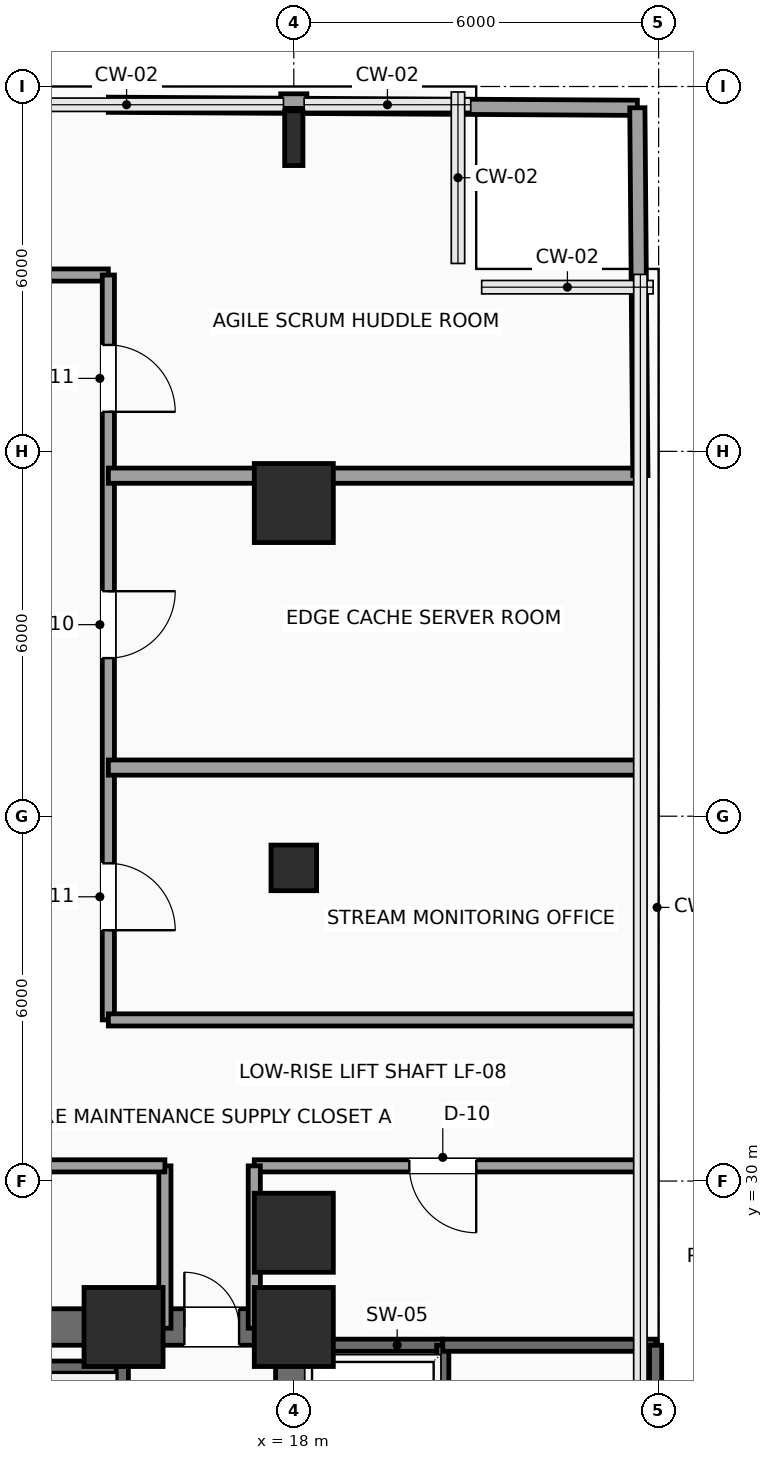
"""IFC4 building model, lengths in metres.
Left out: names, types, materials, properties, quantities, classifications, styles, units other than length and angle.
Written with IfcOpenShell. Run it as: python <this file> out.ifc"""

import sys

from ifc_helpers import new_model, si_unit, direction, frame, frame_2d, origin, origin_2d, place, context, subcontext, project, spatial, rectangle, hollow_rectangle, i_section, extrude, element, fill, save


model = new_model("IFC4")
c1 = context("Model", 3, precision=1e-05, world=origin(), true_north=direction((0.0, 1.0)))
c2 = subcontext(c1, "Body", "Model", "MODEL_VIEW")
j1 = project(units=[si_unit("LENGTHUNIT", "METRE"), si_unit("PLANEANGLEUNIT", "RADIAN")], contexts=[c1])
p1 = place(None, origin())
s1 = spatial("IfcSite", under=j1, at=p1, CompositionType="ELEMENT")
p2 = place(p1, origin())
s2 = spatial("IfcBuilding", under=s1, at=p2, CompositionType="ELEMENT")
p3 = place(p2, frame((0.0, 0.0, 83.1)))
s3 = spatial("IfcBuildingStorey", under=s2, at=p3, CompositionType="ELEMENT", Elevation=83.1)
for number, where, z_axis, x_axis in (
    (1, (15.2, 27.6, 0.0), (0.0, 0.0, 1.0), (1.0, 0.0, 0.0)),
    (2, (18.0, 27.6, 0.0), (0.0, 0.0, 1.0), (1.0, 0.0, 0.0)),
    (3, (18.0, 29.15, 0.0), (0.0, 0.0, 1.0), (1.0, 0.0, 0.0)),
):
    element("IfcColumn", number, at=place(p3, frame(where, z_axis=z_axis, x_axis=x_axis)), inside=s3, PredefinedType="COLUMN", context=c2, shape_type="SweptSolid", body=[
        extrude(rectangle(XDim=1.3, YDim=1.3, at=origin_2d()), origin(), (0.0, 0.0, 1.0), 3.9),
    ])
p4 = place(p3, frame((18.0, 35.15, 0.0), z_axis=(0.0, 0.0, 1.0), x_axis=(1.0, 0.0, 0.0)))
e4 = element("IfcColumn", 4, at=p4, inside=s3, PredefinedType="COLUMN", context=c2, shape_type="SweptSolid", body=[
    extrude(hollow_rectangle(XDim=0.75, YDim=0.75, WallThickness=0.035, InnerFilletRadius=0.035, OuterFilletRadius=0.05, at=origin_2d()), origin(), (0.0, 0.0, 1.0), 3.9),
])
p5 = place(p3, frame((18.0, 41.15, 0.0), z_axis=(0.0, 0.0, 1.0), x_axis=(1.0, 0.0, 0.0)))
e5 = element("IfcColumn", 5, at=p5, inside=s3, PredefinedType="COLUMN", context=c2, shape_type="SweptSolid", body=[
    extrude(rectangle(XDim=1.3, YDim=1.3, at=origin_2d()), origin(), (0.0, 0.0, 1.0), 3.9),
])
p6 = place(p3, frame((18.0, 47.15, 0.0), z_axis=(0.0, 0.0, 1.0), x_axis=(1.0, 0.0, 0.0)))
e6 = element("IfcColumn", 6, at=p6, inside=s3, PredefinedType="COLUMN", context=c2, shape_type="SweptSolid", body=[
    extrude(i_section(OverallWidth=0.3, OverallDepth=0.9, WebThickness=0.019, FlangeThickness=0.035, FilletRadius=0.03, at=origin_2d()), origin(), (0.0, 0.0, 1.0), 3.9),
])
p7 = place(p3, frame((17.785, 47.76, 0.0), z_axis=(0.0, 0.0, 1.0), x_axis=(1.0, 0.0, 0.0)))
e7 = element("IfcWall", 7, at=p7, inside=s3, PredefinedType="SOLIDWALL", context=c2, shape_type="SweptSolid", body=[
    extrude(rectangle(XDim=0.43, YDim=0.24, at=frame_2d((0.215, 0.0))), origin(), (0.0, 0.0, 1.0), 3.65),
])
p8 = place(p3, frame((6.0, 27.6, 0.0), z_axis=(0.0, 0.0, 1.0), x_axis=(1.0, 0.0, 0.0)))
e8 = element("IfcWall", 8, at=p8, inside=s3, PredefinedType="SHEAR", context=c2, shape_type="SweptSolid", body=[
    extrude(rectangle(XDim=12.0, YDim=0.6, at=frame_2d((6.0, 0.0))), origin(), (0.0, 0.0, 1.0), 3.65),
])
p9 = place(p8, frame((10.2, 0.0, 0.0)))
e9 = element("IfcOpeningElement", 9, at=p9, cuts=e8, PredefinedType="OPENING", context=c2, shape_type="SweptSolid", body=[
    extrude(rectangle(XDim=0.9, YDim=2.15, at=frame_2d((0.45, 1.075))), frame((0.0, 0.31, 0.0), z_axis=(0.0, -1.0, 0.0), x_axis=(1.0, 0.0, 0.0)), (0.0, 0.0, 1.0), 0.62),
])
p10 = place(p3, frame((18.0, 18.0, 0.0), z_axis=(0.0, 0.0, 1.0), x_axis=(0.0, 1.0, 0.0)))
e10 = element("IfcWall", 10, at=p10, inside=s3, PredefinedType="SHEAR", context=c2, shape_type="SweptSolid", body=[
    extrude(rectangle(XDim=9.6, YDim=0.6, at=frame_2d((4.8, 0.0))), origin(), (0.0, 0.0, 1.0), 3.65),
])
p11 = place(p3, frame((6.3, 26.94, 0.0), z_axis=(0.0, 0.0, 1.0), x_axis=(1.0, 0.0, 0.0)))
e11 = element("IfcWall", 11, at=p11, inside=s3, PredefinedType="SHEAR", context=c2, shape_type="SweptSolid", body=[
    extrude(rectangle(XDim=8.88, YDim=0.2, at=frame_2d((4.44, 0.0))), origin(), (0.0, 0.0, 1.0), 3.65),
])
p12 = place(p3, frame((15.18, 23.26, 0.0), z_axis=(0.0, 0.0, 1.0), x_axis=(0.0, 1.0, 0.0)))
e12 = element("IfcWall", 12, at=p12, inside=s3, PredefinedType="SHEAR", context=c2, shape_type="SweptSolid", body=[
    extrude(rectangle(XDim=4.04, YDim=0.2, at=frame_2d((2.02, 0.0))), origin(), (0.0, 0.0, 1.0), 3.65),
])
p13 = place(p3, frame((18.1, 27.3, 0.0), z_axis=(0.0, 0.0, 1.0), x_axis=(1.0, 0.0, 0.0)))
e13 = element("IfcWall", 13, at=p13, inside=s3, PredefinedType="SHEAR", context=c2, shape_type="SweptSolid", body=[
    extrude(rectangle(XDim=2.35, YDim=0.2, at=frame_2d((1.175, 0.0))), origin(), (0.0, 0.0, 1.0), 3.65),
])
p14 = place(p3, frame((20.45, 18.25, 0.0), z_axis=(0.0, 0.0, 1.0), x_axis=(0.0, 1.0, 0.0)))
e14 = element("IfcWall", 14, at=p14, inside=s3, PredefinedType="SHEAR", context=c2, shape_type="SweptSolid", body=[
    extrude(rectangle(XDim=9.05, YDim=0.2, at=frame_2d((4.525, 0.0))), origin(), (0.0, 0.0, 1.0), 3.65),
])
p15 = place(p14, frame((0.4, 0.0, 0.0)))
e15 = element("IfcOpeningElement", 15, at=p15, cuts=e14, PredefinedType="OPENING", context=c2, shape_type="SweptSolid", body=[
    extrude(rectangle(XDim=1.2, YDim=2.2, at=frame_2d((0.6, 1.1))), frame((0.0, 0.11, 0.0), z_axis=(0.0, -1.0, 0.0), x_axis=(1.0, 0.0, 0.0)), (0.0, 0.0, 1.0), 0.22),
])
p16 = place(p14, frame((2.65, 0.0, 0.0)))
e16 = element("IfcOpeningElement", 16, at=p16, cuts=e14, PredefinedType="OPENING", context=c2, shape_type="SweptSolid", body=[
    extrude(rectangle(XDim=1.2, YDim=2.2, at=frame_2d((0.6, 1.1))), frame((0.0, 0.11, 0.0), z_axis=(0.0, -1.0, 0.0), x_axis=(1.0, 0.0, 0.0)), (0.0, 0.0, 1.0), 0.22),
])
p17 = place(p14, frame((4.9, 0.0, 0.0)))
e17 = element("IfcOpeningElement", 17, at=p17, cuts=e14, PredefinedType="OPENING", context=c2, shape_type="SweptSolid", body=[
    extrude(rectangle(XDim=1.2, YDim=2.2, at=frame_2d((0.6, 1.1))), frame((0.0, 0.11, 0.0), z_axis=(0.0, -1.0, 0.0), x_axis=(1.0, 0.0, 0.0)), (0.0, 0.0, 1.0), 0.22),
])
p18 = place(p14, frame((7.15, 0.0, 0.0)))
e18 = element("IfcOpeningElement", 18, at=p18, cuts=e14, PredefinedType="OPENING", context=c2, shape_type="SweptSolid", body=[
    extrude(rectangle(XDim=1.2, YDim=2.2, at=frame_2d((0.6, 1.1))), frame((0.0, 0.11, 0.0), z_axis=(0.0, -1.0, 0.0), x_axis=(1.0, 0.0, 0.0)), (0.0, 0.0, 1.0), 0.22),
])
p19 = place(p3, frame((20.45, 27.3, 0.0), z_axis=(0.0, 0.0, 1.0), x_axis=(1.0, 0.0, 0.0)))
e19 = element("IfcWall", 19, at=p19, inside=s3, PredefinedType="SHEAR", context=c2, shape_type="SweptSolid", body=[
    extrude(rectangle(XDim=3.5, YDim=0.2, at=frame_2d((1.75, 0.0))), origin(), (0.0, 0.0, 1.0), 3.65),
])
p20 = place(p3, frame((23.95, 18.0, 0.0), z_axis=(0.0, 0.0, 1.0), x_axis=(0.0, 1.0, 0.0)))
e20 = element("IfcWall", 20, at=p20, inside=s3, PredefinedType="SHEAR", context=c2, shape_type="SweptSolid", body=[
    extrude(rectangle(XDim=9.3, YDim=0.2, at=frame_2d((4.65, 0.0))), origin(), (0.0, 0.0, 1.0), 3.65),
])
p21 = place(p3, frame((12.6, 44.9, 0.0), z_axis=(0.0, 0.0, 1.0), x_axis=(1.0, 0.0, 0.0)))
e21 = element("IfcWall", 21, at=p21, inside=s3, PredefinedType="PARTITIONING", context=c2, shape_type="SweptSolid", body=[
    extrude(rectangle(XDim=2.35, YDim=0.2, at=frame_2d((1.175, 0.0))), origin(), (0.0, 0.0, 1.0), 3.65),
])
p22 = place(p3, frame((14.95, 44.9, 0.0), z_axis=(0.0, 0.0, 1.0), x_axis=(0.0, -1.0, 0.0)))
e22 = element("IfcWall", 22, at=p22, inside=s3, PredefinedType="PARTITIONING", context=c2, shape_type="SweptSolid", body=[
    extrude(rectangle(XDim=12.25, YDim=0.2, at=frame_2d((6.125, 0.0))), origin(), (0.0, 0.0, 1.0), 3.65),
])
p23 = place(p22, frame((9.675, 0.0, 0.0)))
e23 = element("IfcOpeningElement", 23, at=p23, cuts=e22, PredefinedType="OPENING", context=c2, shape_type="SweptSolid", body=[
    extrude(rectangle(XDim=1.1, YDim=2.25, at=frame_2d((0.55, 1.125))), frame((0.0, 0.11, 0.0), z_axis=(0.0, -1.0, 0.0), x_axis=(1.0, 0.0, 0.0)), (0.0, 0.0, 1.0), 0.22),
])
p24 = place(p22, frame((5.2, 0.0, 0.0)))
e24 = element("IfcOpeningElement", 24, at=p24, cuts=e22, PredefinedType="OPENING", context=c2, shape_type="SweptSolid", body=[
    extrude(rectangle(XDim=1.1, YDim=2.25, at=frame_2d((0.55, 1.125))), frame((0.0, 0.11, 0.0), z_axis=(0.0, -1.0, 0.0), x_axis=(1.0, 0.0, 0.0)), (0.0, 0.0, 1.0), 0.22),
])
p25 = place(p22, frame((1.15, 0.0, 0.0)))
e25 = element("IfcOpeningElement", 25, at=p25, cuts=e22, PredefinedType="OPENING", context=c2, shape_type="SweptSolid", body=[
    extrude(rectangle(XDim=1.1, YDim=2.25, at=frame_2d((0.55, 1.125))), frame((0.0, 0.11, 0.0), z_axis=(0.0, -1.0, 0.0), x_axis=(1.0, 0.0, 0.0)), (0.0, 0.0, 1.0), 0.22),
])
p26 = place(p3, frame((14.95, 32.65, 0.0), z_axis=(0.0, 0.0, 1.0), x_axis=(1.0, 0.0, 0.0)))
e26 = element("IfcWall", 26, at=p26, inside=s3, PredefinedType="PARTITIONING", context=c2, shape_type="SweptSolid", body=[
    extrude(rectangle(XDim=8.75, YDim=0.2, at=frame_2d((4.375, 0.0))), origin(), (0.0, 0.0, 1.0), 3.65),
])
p27 = place(p3, frame((23.7, 30.25, 0.0), z_axis=(0.0, 0.0, 1.0), x_axis=(-1.0, 0.0, 0.0)))
e27 = element("IfcWall", 27, at=p27, inside=s3, PredefinedType="PARTITIONING", context=c2, shape_type="SweptSolid", body=[
    extrude(rectangle(XDim=6.35, YDim=0.2, at=frame_2d((3.175, 0.0))), origin(), (0.0, 0.0, 1.0), 3.65),
])
p28 = place(p27, frame((2.7, 0.0, 0.0)))
e28 = element("IfcOpeningElement", 28, at=p28, cuts=e27, PredefinedType="OPENING", context=c2, shape_type="SweptSolid", body=[
    extrude(rectangle(XDim=1.1, YDim=2.25, at=frame_2d((0.55, 1.125))), frame((0.0, 0.11, 0.0), z_axis=(0.0, -1.0, 0.0), x_axis=(1.0, 0.0, 0.0)), (0.0, 0.0, 1.0), 0.22),
])
for number, where, z_axis, x_axis in (
    (29, (17.35, 30.25, 0.0), (0.0, 0.0, 1.0), (0.0, -1.0, 0.0)),
    (30, (15.88, 27.58, 0.0), (0.0, 0.0, 1.0), (0.0, 1.0, 0.0)),
):
    element("IfcWall", number, at=place(p3, frame(where, z_axis=z_axis, x_axis=x_axis)), inside=s3, PredefinedType="PARTITIONING", context=c2, shape_type="SweptSolid", body=[
        extrude(rectangle(XDim=2.67, YDim=0.2, at=frame_2d((1.335, 0.0))), origin(), (0.0, 0.0, 1.0), 3.65),
    ])
p29 = place(p3, frame((15.88, 30.25, 0.0), z_axis=(0.0, 0.0, 1.0), x_axis=(-1.0, 0.0, 0.0)))
e31 = element("IfcWall", 31, at=p29, inside=s3, PredefinedType="PARTITIONING", context=c2, shape_type="SweptSolid", body=[
    extrude(rectangle(XDim=10.63, YDim=0.2, at=frame_2d((5.315, 0.0))), origin(), (0.0, 0.0, 1.0), 3.65),
])
p30 = place(p29, frame((6.13, 0.0, 0.0)))
e32 = element("IfcOpeningElement", 32, at=p30, cuts=e31, PredefinedType="OPENING", context=c2, shape_type="SweptSolid", body=[
    extrude(rectangle(XDim=0.9, YDim=2.1, at=frame_2d((0.45, 1.05))), frame((0.0, 0.11, 0.0), z_axis=(0.0, -1.0, 0.0), x_axis=(1.0, 0.0, 0.0)), (0.0, 0.0, 1.0), 0.22),
])
for number, where, z_axis, x_axis in (
    (33, (14.95, 36.8, 0.0), (0.0, 0.0, 1.0), (1.0, 0.0, 0.0)),
    (34, (14.95, 41.6, 0.0), (0.0, 0.0, 1.0), (1.0, 0.0, 0.0)),
):
    element("IfcWall", number, at=place(p3, frame(where, z_axis=z_axis, x_axis=x_axis)), inside=s3, PredefinedType="PARTITIONING", context=c2, shape_type="SweptSolid", body=[
        extrude(rectangle(XDim=8.75, YDim=0.25, at=frame_2d((4.375, 0.0))), origin(), (0.0, 0.0, 1.0), 3.65),
    ])
p31 = place(p3, frame((14.95, 47.7, 0.0), z_axis=(0.0, 0.0, 1.0), x_axis=(0.999983354582, -0.005769797172, 0.0)))
e35 = element("IfcWall", 35, at=p31, inside=s3, PredefinedType="PARTITIONING", context=c2, shape_type="SweptSolid", body=[
    extrude(rectangle(XDim=2.835, YDim=0.25, at=frame_2d((1.417, 0.0))), origin(), (0.0, 0.0, 1.0), 3.65),
])
p32 = place(p3, frame((18.215, 47.681, 0.0), z_axis=(0.0, 0.0, 1.0), x_axis=(0.999983469354, -0.005749871258, 0.0)))
e36 = element("IfcWall", 36, at=p32, inside=s3, PredefinedType="PARTITIONING", context=c2, shape_type="SweptSolid", body=[
    extrude(rectangle(XDim=5.435, YDim=0.25, at=frame_2d((2.717, 0.0))), origin(), (0.0, 0.0, 1.0), 3.65),
])
p33 = place(p3, frame((23.7, 41.6, 0.0), z_axis=(0.0, 0.0, 1.0), x_axis=(-0.008272517568, 0.999965782141, 0.0)))
e37 = element("IfcWall", 37, at=p33, inside=s3, PredefinedType="PARTITIONING", context=c2, shape_type="SweptSolid", body=[
    extrude(rectangle(XDim=6.05, YDim=0.25, at=frame_2d((3.025, 0.0))), origin(), (0.0, 0.0, 1.0), 3.65),
])
p34 = place(p9, origin())
e38 = element("IfcDoor", 38, at=p34, inside=s3, OperationType="SINGLE_SWING_LEFT", PredefinedType="DOOR", context=c2, shape_type="SweptSolid", body=[
    extrude(rectangle(XDim=0.9, YDim=2.15, at=frame_2d((0.45, 1.075))), frame((0.0, 0.025, 0.0), z_axis=(0.0, -1.0, 0.0), x_axis=(1.0, 0.0, 0.0)), (0.0, 0.0, 1.0), 0.05),
])
fill(e9, e38)
p35 = place(p23, origin())
e39 = element("IfcDoor", 39, at=p35, inside=s3, OperationType="SINGLE_SWING_RIGHT", PredefinedType="DOOR", context=c2, shape_type="SweptSolid", body=[
    extrude(rectangle(XDim=1.1, YDim=2.25, at=frame_2d((0.55, 1.125))), frame((0.0, 0.025, 0.0), z_axis=(0.0, -1.0, 0.0), x_axis=(1.0, 0.0, 0.0)), (0.0, 0.0, 1.0), 0.05),
])
fill(e23, e39)
p36 = place(p24, origin())
e40 = element("IfcDoor", 40, at=p36, inside=s3, OperationType="SINGLE_SWING_LEFT", PredefinedType="DOOR", context=c2, shape_type="SweptSolid", body=[
    extrude(rectangle(XDim=1.1, YDim=2.25, at=frame_2d((0.55, 1.125))), frame((0.0, 0.025, 0.0), z_axis=(0.0, -1.0, 0.0), x_axis=(1.0, 0.0, 0.0)), (0.0, 0.0, 1.0), 0.05),
])
fill(e24, e40)
p37 = place(p25, origin())
e41 = element("IfcDoor", 41, at=p37, inside=s3, OperationType="SINGLE_SWING_RIGHT", PredefinedType="DOOR", context=c2, shape_type="SweptSolid", body=[
    extrude(rectangle(XDim=1.1, YDim=2.25, at=frame_2d((0.55, 1.125))), frame((0.0, 0.025, 0.0), z_axis=(0.0, -1.0, 0.0), x_axis=(1.0, 0.0, 0.0)), (0.0, 0.0, 1.0), 0.05),
])
fill(e25, e41)
p38 = place(p28, origin())
e42 = element("IfcDoor", 42, at=p38, inside=s3, OperationType="SINGLE_SWING_LEFT", PredefinedType="DOOR", context=c2, shape_type="SweptSolid", body=[
    extrude(rectangle(XDim=1.1, YDim=2.25, at=frame_2d((0.55, 1.125))), frame((0.0, 0.025, 0.0), z_axis=(0.0, -1.0, 0.0), x_axis=(1.0, 0.0, 0.0)), (0.0, 0.0, 1.0), 0.05),
])
fill(e28, e42)
save(model, sys.argv[1])
